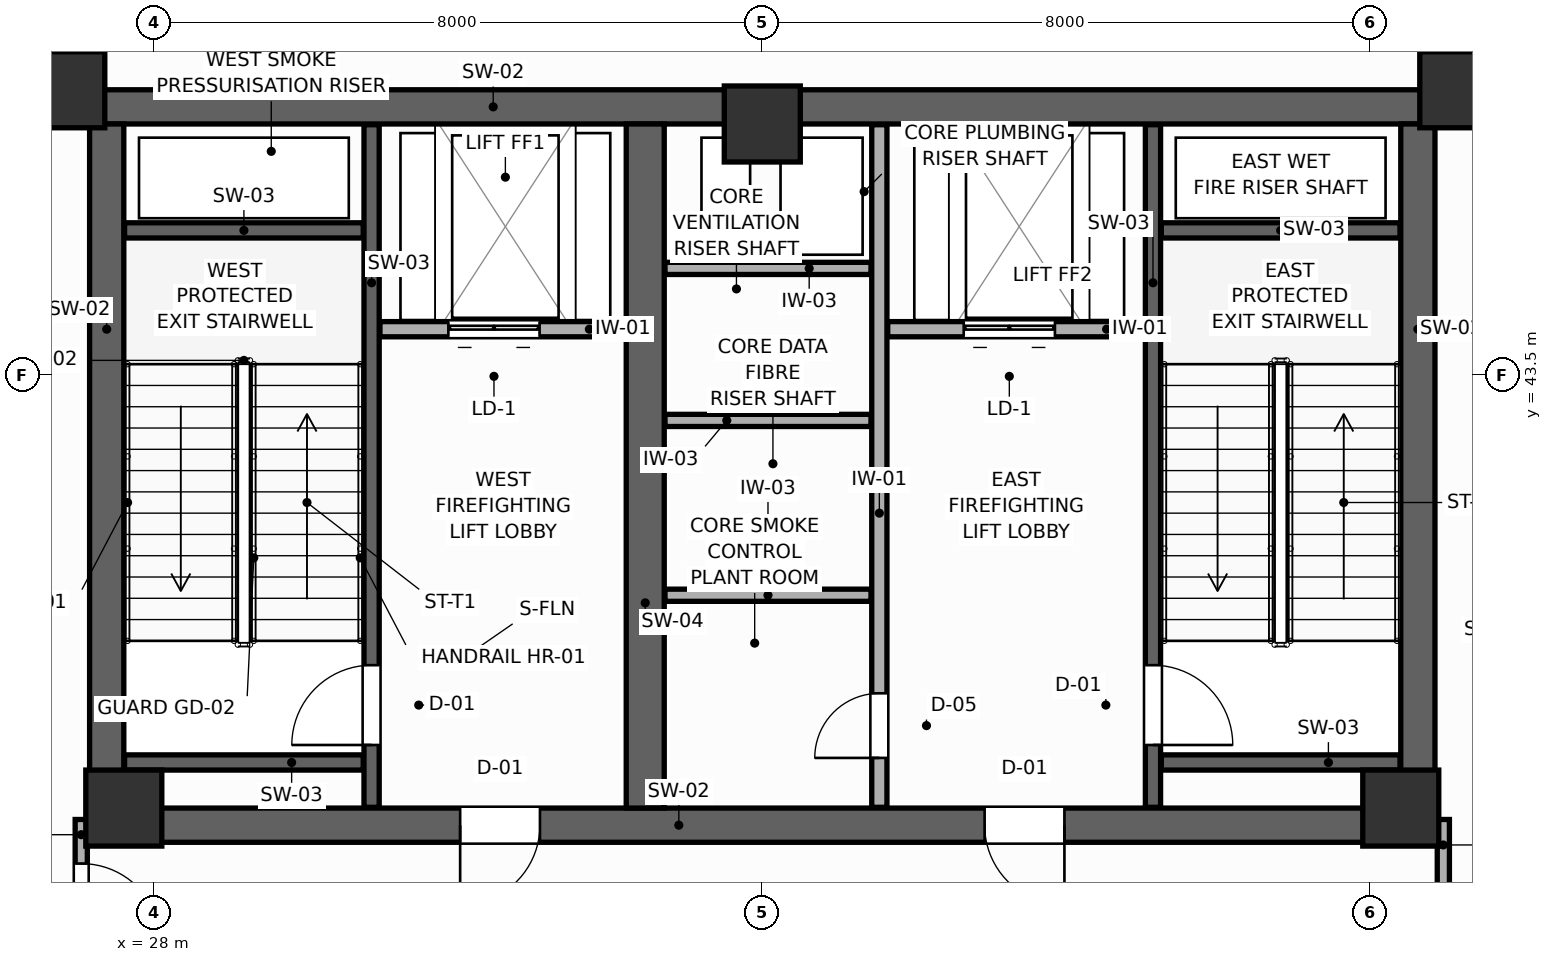
"""IFC4 building model, lengths in metres.
Left out: names, types, materials, properties, quantities, classifications, styles, units other than length and angle.
Written with IfcOpenShell. Run it as: python <this file> out.ifc"""

import sys

from ifc_helpers import new_model, si_unit, direction, frame, frame_2d, origin, origin_2d, place, context, subcontext, project, spatial, rectangle, extrude, source, transform, mapped, element, fill, save


model = new_model("IFC4")
c1 = context("Model", 3, precision=1e-05, world=origin(), true_north=direction((0.0, 1.0)))
c2 = subcontext(c1, "Body", "Model", "MODEL_VIEW")
j1 = project(units=[si_unit("LENGTHUNIT", "METRE"), si_unit("PLANEANGLEUNIT", "RADIAN")], contexts=[c1])
p1 = place(None, origin())
s1 = spatial("IfcSite", under=j1, at=p1, CompositionType="ELEMENT")
p2 = place(p1, origin())
s2 = spatial("IfcBuilding", under=s1, at=p2, CompositionType="ELEMENT")
p3 = place(p2, frame((0.0, 0.0, 201.0)))
s3 = spatial("IfcBuildingStorey", under=s2, at=p3, CompositionType="ELEMENT", Elevation=201.0)
p4 = place(p3, frame((27.15, 47.025, 0.0), z_axis=(0.0, 0.0, 1.0), x_axis=(1.0, 0.0, 0.0)))
e1 = element("IfcWall", 1, at=p4, inside=s3, PredefinedType="SHEAR", context=c2, shape_type="SweptSolid", body=[
    extrude(rectangle(XDim=17.7, YDim=0.45, at=frame_2d((8.85, 0.0))), origin(), (0.0, 0.0, 1.0), 4.8),
])
p5 = place(p3, frame((27.15, 37.575, 0.0), z_axis=(0.0, 0.0, 1.0), x_axis=(1.0, 0.0, 0.0)))
e2 = element("IfcWall", 2, at=p5, inside=s3, PredefinedType="SHEAR", context=c2, shape_type="SweptSolid", body=[
    extrude(rectangle(XDim=17.7, YDim=0.45, at=frame_2d((8.85, 0.0))), origin(), (0.0, 0.0, 1.0), 4.8),
])
p6 = place(p5, frame((4.875, 0.0, 0.0)))
e3 = element("IfcOpeningElement", 3, at=p6, cuts=e2, PredefinedType="OPENING", context=c2, shape_type="SweptSolid", body=[
    extrude(rectangle(XDim=1.05, YDim=2.1, at=frame_2d((0.525, 1.05))), frame((0.0, 0.235, 0.0), z_axis=(0.0, -1.0, 0.0), x_axis=(1.0, 0.0, 0.0)), (0.0, 0.0, 1.0), 0.47),
])
p7 = place(p5, frame((11.775, 0.0, 0.0)))
e4 = element("IfcOpeningElement", 4, at=p7, cuts=e2, PredefinedType="OPENING", context=c2, shape_type="SweptSolid", body=[
    extrude(rectangle(XDim=1.05, YDim=2.1, at=frame_2d((0.525, 1.05))), frame((0.0, 0.235, 0.0), z_axis=(0.0, -1.0, 0.0), x_axis=(1.0, 0.0, 0.0)), (0.0, 0.0, 1.0), 0.47),
])
for number, where, z_axis, x_axis in (
    (5, (27.375, 37.8, 0.0), (0.0, 0.0, 1.0), (0.0, 1.0, 0.0)),
    (6, (44.625, 37.8, 0.0), (0.0, 0.0, 1.0), (0.0, 1.0, 0.0)),
):
    element("IfcWall", number, at=place(p3, frame(where, z_axis=z_axis, x_axis=x_axis)), inside=s3, PredefinedType="SHEAR", context=c2, shape_type="SweptSolid", body=[
        extrude(rectangle(XDim=9.0, YDim=0.45, at=frame_2d((4.5, 0.0))), origin(), (0.0, 0.0, 1.0), 4.8),
    ])
p8 = place(p3, frame((34.46, 37.8, 0.0), z_axis=(0.0, 0.0, 1.0), x_axis=(0.0, 1.0, 0.0)))
e7 = element("IfcWall", 7, at=p8, inside=s3, PredefinedType="SHEAR", context=c2, shape_type="SweptSolid", body=[
    extrude(rectangle(XDim=9.0, YDim=0.5, at=frame_2d((4.5, 0.0))), origin(), (0.0, 0.0, 1.0), 4.61),
])
m1 = source(origin(), c2, "Body", "SweptSolid", [
    extrude(rectangle(XDim=1.0, YDim=1.0, at=origin_2d()), origin(), (0.0, 0.0, 1.0), 4.8),
])
for number, where, z_axis, x_axis in (
    (8, (26.85, 47.25, 0.0), (0.0, 0.0, 1.0), (1.0, 0.0, 0.0)),
    (9, (45.15, 47.25, 0.0), (0.0, 0.0, 1.0), (1.0, 0.0, 0.0)),
    (10, (27.6, 37.8, 0.0), (0.0, 0.0, 1.0), (1.0, 0.0, 0.0)),
    (11, (44.4, 37.8, 0.0), (0.0, 0.0, 1.0), (1.0, 0.0, 0.0)),
    (12, (36.0, 46.8, 0.0), (0.0, 0.0, 1.0), (1.0, 0.0, 0.0)),
):
    element("IfcColumn", number, at=place(p3, frame(where, z_axis=z_axis, x_axis=x_axis)), inside=s3, PredefinedType="COLUMN", context=c2, shape_type="MappedRepresentation", body=[
        mapped(m1, transform((0.0, 0.0, 0.0), scale=1.0)),
    ])
p9 = place(p3, frame((30.86, 37.81, 0.0), z_axis=(0.0, 0.0, 1.0), x_axis=(0.0, 1.0, 0.0)))
e13 = element("IfcWall", 13, at=p9, inside=s3, PredefinedType="SHEAR", context=c2, shape_type="SweptSolid", body=[
    extrude(rectangle(XDim=8.98, YDim=0.2, at=frame_2d((4.49, 0.0))), origin(), (0.0, 0.0, 1.0), 4.8),
])
p10 = place(p9, frame((0.82, 0.0, 0.0)))
e14 = element("IfcOpeningElement", 14, at=p10, cuts=e13, PredefinedType="OPENING", context=c2, shape_type="SweptSolid", body=[
    extrude(rectangle(XDim=1.05, YDim=2.1, at=frame_2d((0.525, 1.05))), frame((0.0, 0.11, 0.0), z_axis=(0.0, -1.0, 0.0), x_axis=(1.0, 0.0, 0.0)), (0.0, 0.0, 1.0), 0.22),
])
for number, where, z_axis, x_axis in (
    (15, (27.61, 45.4, 0.0), (0.0, 0.0, 1.0), (1.0, 0.0, 0.0)),
    (16, (27.61, 38.4, 0.0), (0.0, 0.0, 1.0), (1.0, 0.0, 0.0)),
):
    element("IfcWall", number, at=place(p3, frame(where, z_axis=z_axis, x_axis=x_axis)), inside=s3, PredefinedType="SHEAR", context=c2, shape_type="SweptSolid", body=[
        extrude(rectangle(XDim=3.14, YDim=0.2, at=frame_2d((1.57, 0.0))), origin(), (0.0, 0.0, 1.0), 4.8),
    ])
p11 = place(p3, frame((41.14, 37.81, 0.0), z_axis=(0.0, 0.0, 1.0), x_axis=(0.0, 1.0, 0.0)))
e17 = element("IfcWall", 17, at=p11, inside=s3, PredefinedType="SHEAR", context=c2, shape_type="SweptSolid", body=[
    extrude(rectangle(XDim=8.98, YDim=0.2, at=frame_2d((4.49, 0.0))), origin(), (0.0, 0.0, 1.0), 4.8),
])
p12 = place(p11, frame((0.82, 0.0, 0.0)))
e18 = element("IfcOpeningElement", 18, at=p12, cuts=e17, PredefinedType="OPENING", context=c2, shape_type="SweptSolid", body=[
    extrude(rectangle(XDim=1.05, YDim=2.1, at=frame_2d((0.525, 1.05))), frame((0.0, 0.11, 0.0), z_axis=(0.0, -1.0, 0.0), x_axis=(1.0, 0.0, 0.0)), (0.0, 0.0, 1.0), 0.22),
])
for number, where, z_axis, x_axis in (
    (19, (41.25, 45.4, 0.0), (0.0, 0.0, 1.0), (1.0, 0.0, 0.0)),
    (20, (41.25, 38.4, 0.0), (0.0, 0.0, 1.0), (1.0, 0.0, 0.0)),
):
    element("IfcWall", number, at=place(p3, frame(where, z_axis=z_axis, x_axis=x_axis)), inside=s3, PredefinedType="SHEAR", context=c2, shape_type="SweptSolid", body=[
        extrude(rectangle(XDim=3.14, YDim=0.2, at=frame_2d((1.57, 0.0))), origin(), (0.0, 0.0, 1.0), 4.8),
    ])
p13 = place(p3, frame((30.97, 44.1, 0.0), z_axis=(0.0, 0.0, 1.0), x_axis=(1.0, 0.0, 0.0)))
e21 = element("IfcWall", 21, at=p13, inside=s3, PredefinedType="PARTITIONING", context=c2, shape_type="SweptSolid", body=[
    extrude(rectangle(XDim=3.23, YDim=0.2, at=frame_2d((1.615, 0.0))), origin(), (0.0, 0.0, 1.0), 4.61),
])
p14 = place(p13, frame((0.9, 0.0, 0.0)))
e22 = element("IfcOpeningElement", 22, at=p14, cuts=e21, PredefinedType="OPENING", context=c2, shape_type="SweptSolid", body=[
    extrude(rectangle(XDim=1.2, YDim=2.1, at=frame_2d((0.6, 1.05))), frame((0.0, 0.11, 0.0), z_axis=(0.0, -1.0, 0.0), x_axis=(1.0, 0.0, 0.0)), (0.0, 0.0, 1.0), 0.22),
])
p15 = place(p3, frame((37.65, 44.1, 0.0), z_axis=(0.0, 0.0, 1.0), x_axis=(1.0, 0.0, 0.0)))
e23 = element("IfcWall", 23, at=p15, inside=s3, PredefinedType="PARTITIONING", context=c2, shape_type="SweptSolid", body=[
    extrude(rectangle(XDim=3.38, YDim=0.2, at=frame_2d((1.69, 0.0))), origin(), (0.0, 0.0, 1.0), 4.61),
])
p16 = place(p15, frame((1.0, 0.0, 0.0)))
e24 = element("IfcOpeningElement", 24, at=p16, cuts=e23, PredefinedType="OPENING", context=c2, shape_type="SweptSolid", body=[
    extrude(rectangle(XDim=1.2, YDim=2.1, at=frame_2d((0.6, 1.05))), frame((0.0, 0.11, 0.0), z_axis=(0.0, -1.0, 0.0), x_axis=(1.0, 0.0, 0.0)), (0.0, 0.0, 1.0), 0.22),
])
p17 = place(p3, frame((37.54, 37.81, 0.0), z_axis=(0.0, 0.0, 1.0), x_axis=(0.0, 1.0, 0.0)))
e25 = element("IfcWall", 25, at=p17, inside=s3, PredefinedType="PARTITIONING", context=c2, shape_type="SweptSolid", body=[
    extrude(rectangle(XDim=8.98, YDim=0.2, at=frame_2d((4.49, 0.0))), origin(), (0.0, 0.0, 1.0), 4.61),
])
p18 = place(p17, frame((0.65, 0.0, 0.0)))
e26 = element("IfcOpeningElement", 26, at=p18, cuts=e25, PredefinedType="OPENING", context=c2, shape_type="SweptSolid", body=[
    extrude(rectangle(XDim=0.85, YDim=2.05, at=frame_2d((0.425, 1.025))), frame((0.0, 0.11, 0.0), z_axis=(0.0, -1.0, 0.0), x_axis=(1.0, 0.0, 0.0)), (0.0, 0.0, 1.0), 0.22),
])
for number, where, z_axis, x_axis in (
    (27, (34.72, 40.6, 0.0), (0.0, 0.0, 1.0), (1.0, 0.0, 0.0)),
    (28, (34.72, 42.9, 0.0), (0.0, 0.0, 1.0), (1.0, 0.0, 0.0)),
    (29, (34.72, 44.9, 0.0), (0.0, 0.0, 1.0), (1.0, 0.0, 0.0)),
):
    element("IfcWall", number, at=place(p3, frame(where, z_axis=z_axis, x_axis=x_axis)), inside=s3, PredefinedType="PARTITIONING", context=c2, shape_type="SweptSolid", body=[
        extrude(rectangle(XDim=2.71, YDim=0.16, at=frame_2d((1.355, 0.0))), origin(), (0.0, 0.0, 1.0), 4.61),
    ])
p19 = place(p3, frame((27.04, 35.54, 0.0), z_axis=(0.0, 0.0, 1.0), x_axis=(0.0, 1.0, 0.0)))
e30 = element("IfcWall", 30, at=p19, inside=s3, PredefinedType="PARTITIONING", context=c2, shape_type="SweptSolid", body=[
    extrude(rectangle(XDim=2.11, YDim=0.16, at=frame_2d((1.055, 0.0))), origin(), (0.0, 0.0, 1.0), 4.61),
])
p20 = place(p19, frame((0.48, 0.0, 0.0)))
e31 = element("IfcOpeningElement", 31, at=p20, cuts=e30, PredefinedType="OPENING", context=c2, shape_type="SweptSolid", body=[
    extrude(rectangle(XDim=1.05, YDim=2.1, at=frame_2d((0.525, 1.05))), frame((0.0, 0.09, 0.0), z_axis=(0.0, -1.0, 0.0), x_axis=(1.0, 0.0, 0.0)), (0.0, 0.0, 1.0), 0.18),
])
p21 = place(p3, frame((44.96, 35.0, 0.0), z_axis=(0.0, 0.0, 1.0), x_axis=(0.0, 1.0, 0.0)))
e32 = element("IfcWall", 32, at=p21, inside=s3, PredefinedType="PARTITIONING", context=c2, shape_type="SweptSolid", body=[
    extrude(rectangle(XDim=2.65, YDim=0.16, at=frame_2d((1.325, 0.0))), origin(), (0.0, 0.0, 1.0), 4.61),
])
p22 = place(p21, frame((0.75, 0.0, 0.0)))
e33 = element("IfcOpeningElement", 33, at=p22, cuts=e32, PredefinedType="OPENING", context=c2, shape_type="SweptSolid", body=[
    extrude(rectangle(XDim=1.05, YDim=2.1, at=frame_2d((0.525, 1.05))), frame((0.0, 0.09, 0.0), z_axis=(0.0, -1.0, 0.0), x_axis=(1.0, 0.0, 0.0)), (0.0, 0.0, 1.0), 0.18),
])
p23 = place(p10, origin())
e34 = element("IfcDoor", 34, at=p23, inside=s3, OperationType="SINGLE_SWING_LEFT", PredefinedType="DOOR", context=c2, shape_type="SweptSolid", body=[
    extrude(rectangle(XDim=1.05, YDim=2.1, at=frame_2d((0.525, 1.05))), frame((0.0, 0.025, 0.0), z_axis=(0.0, -1.0, 0.0), x_axis=(1.0, 0.0, 0.0)), (0.0, 0.0, 1.0), 0.05),
])
fill(e14, e34)
p24 = place(p12, frame((1.05, 0.0, 0.0), z_axis=(0.0, 0.0, 1.0), x_axis=(-1.0, 0.0, 0.0)))
e35 = element("IfcDoor", 35, at=p24, inside=s3, OperationType="SINGLE_SWING_RIGHT", PredefinedType="DOOR", context=c2, shape_type="SweptSolid", body=[
    extrude(rectangle(XDim=1.05, YDim=2.1, at=frame_2d((0.525, 1.05))), frame((0.0, 0.025, 0.0), z_axis=(0.0, -1.0, 0.0), x_axis=(1.0, 0.0, 0.0)), (0.0, 0.0, 1.0), 0.05),
])
fill(e18, e35)
p25 = place(p14, origin())
e36 = element("IfcDoor", 36, at=p25, inside=s3, OperationType="DOUBLE_DOOR_SLIDING", PredefinedType="DOOR", context=c2, shape_type="SweptSolid", body=[
    extrude(rectangle(XDim=1.2, YDim=2.1, at=frame_2d((0.6, 1.05))), frame((0.0, 0.025, 0.0), z_axis=(0.0, -1.0, 0.0), x_axis=(1.0, 0.0, 0.0)), (0.0, 0.0, 1.0), 0.05),
])
fill(e22, e36)
p26 = place(p16, origin())
e37 = element("IfcDoor", 37, at=p26, inside=s3, OperationType="DOUBLE_DOOR_SLIDING", PredefinedType="DOOR", context=c2, shape_type="SweptSolid", body=[
    extrude(rectangle(XDim=1.2, YDim=2.1, at=frame_2d((0.6, 1.05))), frame((0.0, 0.025, 0.0), z_axis=(0.0, -1.0, 0.0), x_axis=(1.0, 0.0, 0.0)), (0.0, 0.0, 1.0), 0.05),
])
fill(e24, e37)
p27 = place(p18, origin())
e38 = element("IfcDoor", 38, at=p27, inside=s3, OperationType="SINGLE_SWING_LEFT", PredefinedType="DOOR", context=c2, shape_type="SweptSolid", body=[
    extrude(rectangle(XDim=0.85, YDim=2.05, at=frame_2d((0.425, 1.025))), frame((0.0, 0.025, 0.0), z_axis=(0.0, -1.0, 0.0), x_axis=(1.0, 0.0, 0.0)), (0.0, 0.0, 1.0), 0.05),
])
fill(e26, e38)
p28 = place(p20, frame((1.05, 0.0, 0.0), z_axis=(0.0, 0.0, 1.0), x_axis=(-1.0, 0.0, 0.0)))
e39 = element("IfcDoor", 39, at=p28, inside=s3, OperationType="SINGLE_SWING_RIGHT", PredefinedType="DOOR", context=c2, shape_type="SweptSolid", body=[
    extrude(rectangle(XDim=1.05, YDim=2.1, at=frame_2d((0.525, 1.05))), frame((0.0, 0.025, 0.0), z_axis=(0.0, -1.0, 0.0), x_axis=(1.0, 0.0, 0.0)), (0.0, 0.0, 1.0), 0.05),
])
fill(e31, e39)
p29 = place(p6, frame((1.05, 0.0, 0.0), z_axis=(0.0, 0.0, 1.0), x_axis=(-1.0, 0.0, 0.0)))
e40 = element("IfcDoor", 40, at=p29, inside=s3, OperationType="SINGLE_SWING_RIGHT", PredefinedType="DOOR", context=c2, shape_type="SweptSolid", body=[
    extrude(rectangle(XDim=1.05, YDim=2.1, at=frame_2d((0.525, 1.05))), frame((0.0, 0.025, 0.0), z_axis=(0.0, -1.0, 0.0), x_axis=(1.0, 0.0, 0.0)), (0.0, 0.0, 1.0), 0.05),
])
fill(e3, e40)
p30 = place(p7, frame((1.05, 0.0, 0.0), z_axis=(0.0, 0.0, 1.0), x_axis=(-1.0, 0.0, 0.0)))
e41 = element("IfcDoor", 41, at=p30, inside=s3, OperationType="SINGLE_SWING_LEFT", PredefinedType="DOOR", context=c2, shape_type="SweptSolid", body=[
    extrude(rectangle(XDim=1.05, YDim=2.1, at=frame_2d((0.525, 1.05))), frame((0.0, 0.025, 0.0), z_axis=(0.0, -1.0, 0.0), x_axis=(1.0, 0.0, 0.0)), (0.0, 0.0, 1.0), 0.05),
])
fill(e4, e41)
save(model, sys.argv[1])
